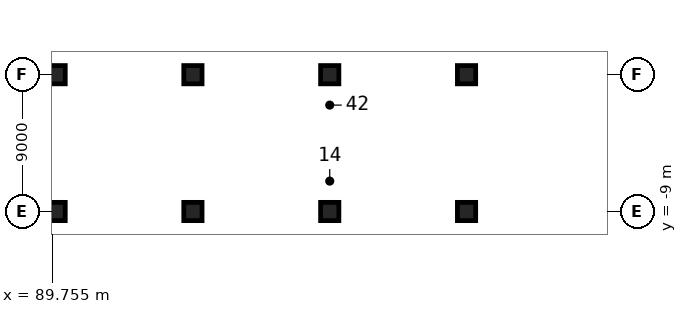
"""IFC4 building model, lengths in metres.
Left out: names, types, materials, properties, quantities, classifications, styles, units other than length and angle.
Written with IfcOpenShell. Run it as: python <this file> out.ifc"""

import sys

from ifc_helpers import new_model, si_unit, direction, frame, origin, origin_2d, place, context, subcontext, project, spatial, rectangle, extrude, element, save


model = new_model("IFC4")
c1 = context("Model", 3, precision=1e-05, world=origin(), true_north=direction((0.0, 1.0)))
c2 = subcontext(c1, "Body", "Model", "MODEL_VIEW")
j1 = project(units=[si_unit("LENGTHUNIT", "METRE"), si_unit("PLANEANGLEUNIT", "RADIAN")], contexts=[c1])
p1 = place(None, origin())
s1 = spatial("IfcSite", under=j1, at=p1, CompositionType="ELEMENT")
p2 = place(p1, origin())
s2 = spatial("IfcBuilding", under=s1, at=p2, CompositionType="ELEMENT")
p3 = place(p2, frame((0.0, 0.0, -4.5)))
s3 = spatial("IfcBuildingStorey", under=s2, at=p3, CompositionType="ELEMENT", Elevation=-4.5)
for number, where, z_axis, x_axis in (
    (1, (90.0, -9.0, 0.0), (0.0, 0.0, 1.0), (1.0, 0.0, 0.0)),
    (2, (90.0, 0.0, 0.0), (0.0, 0.0, 1.0), (1.0, 0.0, 0.0)),
    (3, (99.0, -9.0, 0.0), (0.0, 0.0, 1.0), (1.0, 0.0, 0.0)),
    (4, (99.0, 0.0, 0.0), (0.0, 0.0, 1.0), (1.0, 0.0, 0.0)),
    (5, (108.0, -9.0, 0.0), (0.0, 0.0, 1.0), (1.0, 0.0, 0.0)),
    (6, (108.0, 0.0, 0.0), (0.0, 0.0, 1.0), (1.0, 0.0, 0.0)),
    (7, (117.0, -9.0, 0.0), (0.0, 0.0, 1.0), (1.0, 0.0, 0.0)),
    (8, (117.0, 0.0, 0.0), (0.0, 0.0, 1.0), (1.0, 0.0, 0.0)),
):
    element("IfcColumn", number, at=place(p3, frame(where, z_axis=z_axis, x_axis=x_axis)), inside=s3, PredefinedType="COLUMN", context=c2, shape_type="SweptSolid", body=[
        extrude(rectangle(XDim=1.2, YDim=1.2, at=origin_2d()), origin(), (0.0, 0.0, 1.0), 4.5),
    ])
save(model, sys.argv[1])
